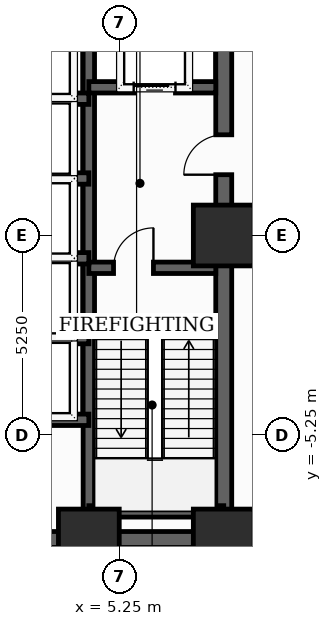
"""IFC4 building model, lengths in metres.
Left out: names, types, materials, properties, quantities, classifications, styles, units other than length and angle.
Written with IfcOpenShell. Run it as: python <this file> out.ifc"""

import sys

from ifc_helpers import new_model, si_unit, direction, frame, frame_2d, origin, origin_2d, place, context, subcontext, project, spatial, rectangle, extrude, element, fill, save


model = new_model("IFC4")
c1 = context("Model", 3, precision=1e-05, world=origin(), true_north=direction((0.0, 1.0)))
c2 = subcontext(c1, "Body", "Model", "MODEL_VIEW")
j1 = project(units=[si_unit("LENGTHUNIT", "METRE"), si_unit("PLANEANGLEUNIT", "RADIAN")], contexts=[c1])
p1 = place(None, origin())
s1 = spatial("IfcSite", under=j1, at=p1, CompositionType="ELEMENT")
p2 = place(p1, origin())
s2 = spatial("IfcBuilding", under=s1, at=p2, CompositionType="ELEMENT")
p3 = place(p2, frame((0.0, 0.0, 15.6)))
s3 = spatial("IfcBuildingStorey", under=s2, at=p3, CompositionType="ELEMENT", Elevation=15.6)
for number, where, z_axis, x_axis in (
    (1, (4.45, -8.0, 0.0), (0.0, 0.0, 1.0), (1.0, 0.0, 0.0)),
    (2, (8.0, -8.0, 0.0), (0.0, 0.0, 1.0), (1.0, 0.0, 0.0)),
    (3, (8.0, 0.0, 0.0), (0.0, 0.0, 1.0), (1.0, 0.0, 0.0)),
):
    element("IfcColumn", number, at=place(p3, frame(where, z_axis=z_axis, x_axis=x_axis)), inside=s3, PredefinedType="COLUMN", context=c2, shape_type="SweptSolid", body=[
        extrude(rectangle(XDim=1.6, YDim=1.6, at=origin_2d()), origin(), (0.0, 0.0, 1.0), 5.2),
    ])
p4 = place(p3, frame((8.0, -8.0, 0.0), z_axis=(0.0, 0.0, 1.0), x_axis=(0.0, 1.0, 0.0)))
e4 = element("IfcWall", 4, at=p4, inside=s3, PredefinedType="SHEAR", context=c2, shape_type="SweptSolid", body=[
    extrude(rectangle(XDim=16.0, YDim=0.42, at=frame_2d((8.0, 0.0))), origin(), (0.0, 0.0, 1.0), 4.95),
])
p5 = place(p4, frame((9.6, 0.0, 0.0)))
e5 = element("IfcOpeningElement", 5, at=p5, cuts=e4, PredefinedType="OPENING", context=c2, shape_type="SweptSolid", body=[
    extrude(rectangle(XDim=1.05, YDim=2.15, at=frame_2d((0.525, 1.075))), frame((0.0, 0.22, 0.0), z_axis=(0.0, -1.0, 0.0), x_axis=(1.0, 0.0, 0.0)), (0.0, 0.0, 1.0), 0.44),
])
p6 = place(p4, frame((14.148, 0.0, 0.0)))
e6 = element("IfcOpeningElement", 6, at=p6, cuts=e4, PredefinedType="OPENING", context=c2, shape_type="SweptSolid", body=[
    extrude(rectangle(XDim=0.85, YDim=2.02, at=frame_2d((0.425, 1.01))), frame((0.0, 0.22, 0.0), z_axis=(0.0, -1.0, 0.0), x_axis=(1.0, 0.0, 0.0)), (0.0, 0.0, 1.0), 0.44),
])
p7 = place(p3, frame((-8.0, -8.0, 0.0), z_axis=(0.0, 0.0, 1.0), x_axis=(1.0, 0.0, 0.0)))
e7 = element("IfcWall", 7, at=p7, inside=s3, PredefinedType="SHEAR", context=c2, shape_type="SweptSolid", body=[
    extrude(rectangle(XDim=16.0, YDim=0.42, at=frame_2d((8.0, 0.0))), origin(), (0.0, 0.0, 1.0), 4.95),
])
p8 = place(p7, frame((7.52, 0.0, 0.0)))
e8 = element("IfcOpeningElement", 8, at=p8, cuts=e7, PredefinedType="OPENING", context=c2, shape_type="SweptSolid", body=[
    extrude(rectangle(XDim=0.95, YDim=2.1, at=frame_2d((0.475, 1.05))), frame((0.0, 0.22, 0.0), z_axis=(0.0, -1.0, 0.0), x_axis=(1.0, 0.0, 0.0)), (0.0, 0.0, 1.0), 0.44),
])
p9 = place(p3, frame((4.45, -7.79, 0.0), z_axis=(0.0, 0.0, 1.0), x_axis=(0.0, 1.0, 0.0)))
e9 = element("IfcWall", 9, at=p9, inside=s3, PredefinedType="SHEAR", context=c2, shape_type="SweptSolid", body=[
    extrude(rectangle(XDim=15.58, YDim=0.3, at=frame_2d((7.79, 0.0))), origin(), (0.0, 0.0, 1.0), 4.95),
])
p10 = place(p3, frame((4.45, -0.85, 0.0), z_axis=(0.0, 0.0, 1.0), x_axis=(1.0, 0.0, 0.0)))
e10 = element("IfcWall", 10, at=p10, inside=s3, PredefinedType="SHEAR", context=c2, shape_type="SweptSolid", body=[
    extrude(rectangle(XDim=3.34, YDim=0.3, at=frame_2d((1.67, 0.0))), origin(), (0.0, 0.0, 1.0), 4.95),
])
p11 = place(p10, frame((0.65, 0.0, 0.0)))
e11 = element("IfcOpeningElement", 11, at=p11, cuts=e10, PredefinedType="OPENING", context=c2, shape_type="SweptSolid", body=[
    extrude(rectangle(XDim=1.05, YDim=2.15, at=frame_2d((0.525, 1.075))), frame((0.0, 0.16, 0.0), z_axis=(0.0, -1.0, 0.0), x_axis=(1.0, 0.0, 0.0)), (0.0, 0.0, 1.0), 0.32),
])
p12 = place(p3, frame((4.45, -7.26, 0.0), z_axis=(0.0, 0.0, 1.0), x_axis=(1.0, 0.0, 0.0)))
e12 = element("IfcWall", 12, at=p12, inside=s3, PredefinedType="SHEAR", context=c2, shape_type="SweptSolid", body=[
    extrude(rectangle(XDim=3.55, YDim=0.3, at=frame_2d((1.775, 0.0))), origin(), (0.0, 0.0, 1.0), 4.95),
])
p13 = place(p3, frame((4.45, 3.9, 0.0), z_axis=(0.0, 0.0, 1.0), x_axis=(1.0, 0.0, 0.0)))
e13 = element("IfcWall", 13, at=p13, inside=s3, PredefinedType="SHEAR", context=c2, shape_type="SweptSolid", body=[
    extrude(rectangle(XDim=3.34, YDim=0.3, at=frame_2d((1.67, 0.0))), origin(), (0.0, 0.0, 1.0), 4.95),
])
p14 = place(p13, frame((1.18, 0.0, 0.0)))
e14 = element("IfcOpeningElement", 14, at=p14, cuts=e13, PredefinedType="OPENING", context=c2, shape_type="SweptSolid", body=[
    extrude(rectangle(XDim=1.1, YDim=2.1, at=frame_2d((0.55, 1.05))), frame((0.0, 0.16, 0.0), z_axis=(0.0, -1.0, 0.0), x_axis=(1.0, 0.0, 0.0)), (0.0, 0.0, 1.0), 0.32),
])
p15 = place(p3, frame((-4.45, -4.85, 0.0), z_axis=(0.0, 0.0, 1.0), x_axis=(1.0, 0.0, 0.0)))
e15 = element("IfcWall", 15, at=p15, inside=s3, PredefinedType="SHEAR", context=c2, shape_type="SweptSolid", body=[
    extrude(rectangle(XDim=8.9, YDim=0.3, at=frame_2d((4.45, 0.0))), origin(), (0.0, 0.0, 1.0), 4.95),
])
for number, where, z_axis, x_axis in (
    (16, (1.68, 1.5, 0.0), (0.0, 0.0, 1.0), (1.0, 0.0, 0.0)),
    (17, (1.68, 3.6, 0.0), (0.0, 0.0, 1.0), (1.0, 0.0, 0.0)),
    (18, (1.68, -2.7, 0.0), (0.0, 0.0, 1.0), (1.0, 0.0, 0.0)),
    (19, (1.68, -0.6, 0.0), (0.0, 0.0, 1.0), (1.0, 0.0, 0.0)),
):
    element("IfcWall", number, at=place(p3, frame(where, z_axis=z_axis, x_axis=x_axis)), inside=s3, PredefinedType="SHEAR", context=c2, shape_type="SweptSolid", body=[
        extrude(rectangle(XDim=2.77, YDim=0.3, at=frame_2d((1.385, 0.0))), origin(), (0.0, 0.0, 1.0), 4.95),
    ])
p16 = place(p5, origin())
e20 = element("IfcDoor", 20, at=p16, inside=s3, OperationType="SINGLE_SWING_LEFT", PredefinedType="DOOR", context=c2, shape_type="SweptSolid", body=[
    extrude(rectangle(XDim=1.05, YDim=2.15, at=frame_2d((0.525, 1.075))), frame((0.0, 0.025, 0.0), z_axis=(0.0, -1.0, 0.0), x_axis=(1.0, 0.0, 0.0)), (0.0, 0.0, 1.0), 0.05),
])
fill(e5, e20)
p17 = place(p11, origin())
e21 = element("IfcDoor", 21, at=p17, inside=s3, OperationType="SINGLE_SWING_RIGHT", PredefinedType="DOOR", context=c2, shape_type="SweptSolid", body=[
    extrude(rectangle(XDim=1.05, YDim=2.15, at=frame_2d((0.525, 1.075))), frame((0.0, 0.025, 0.0), z_axis=(0.0, -1.0, 0.0), x_axis=(1.0, 0.0, 0.0)), (0.0, 0.0, 1.0), 0.05),
])
fill(e11, e21)
p18 = place(p14, origin())
e22 = element("IfcDoor", 22, at=p18, inside=s3, OperationType="SLIDING_TO_LEFT", PredefinedType="DOOR", context=c2, shape_type="SweptSolid", body=[
    extrude(rectangle(XDim=1.1, YDim=2.1, at=frame_2d((0.55, 1.05))), frame((0.0, 0.025, 0.0), z_axis=(0.0, -1.0, 0.0), x_axis=(1.0, 0.0, 0.0)), (0.0, 0.0, 1.0), 0.05),
])
fill(e14, e22)
save(model, sys.argv[1])
